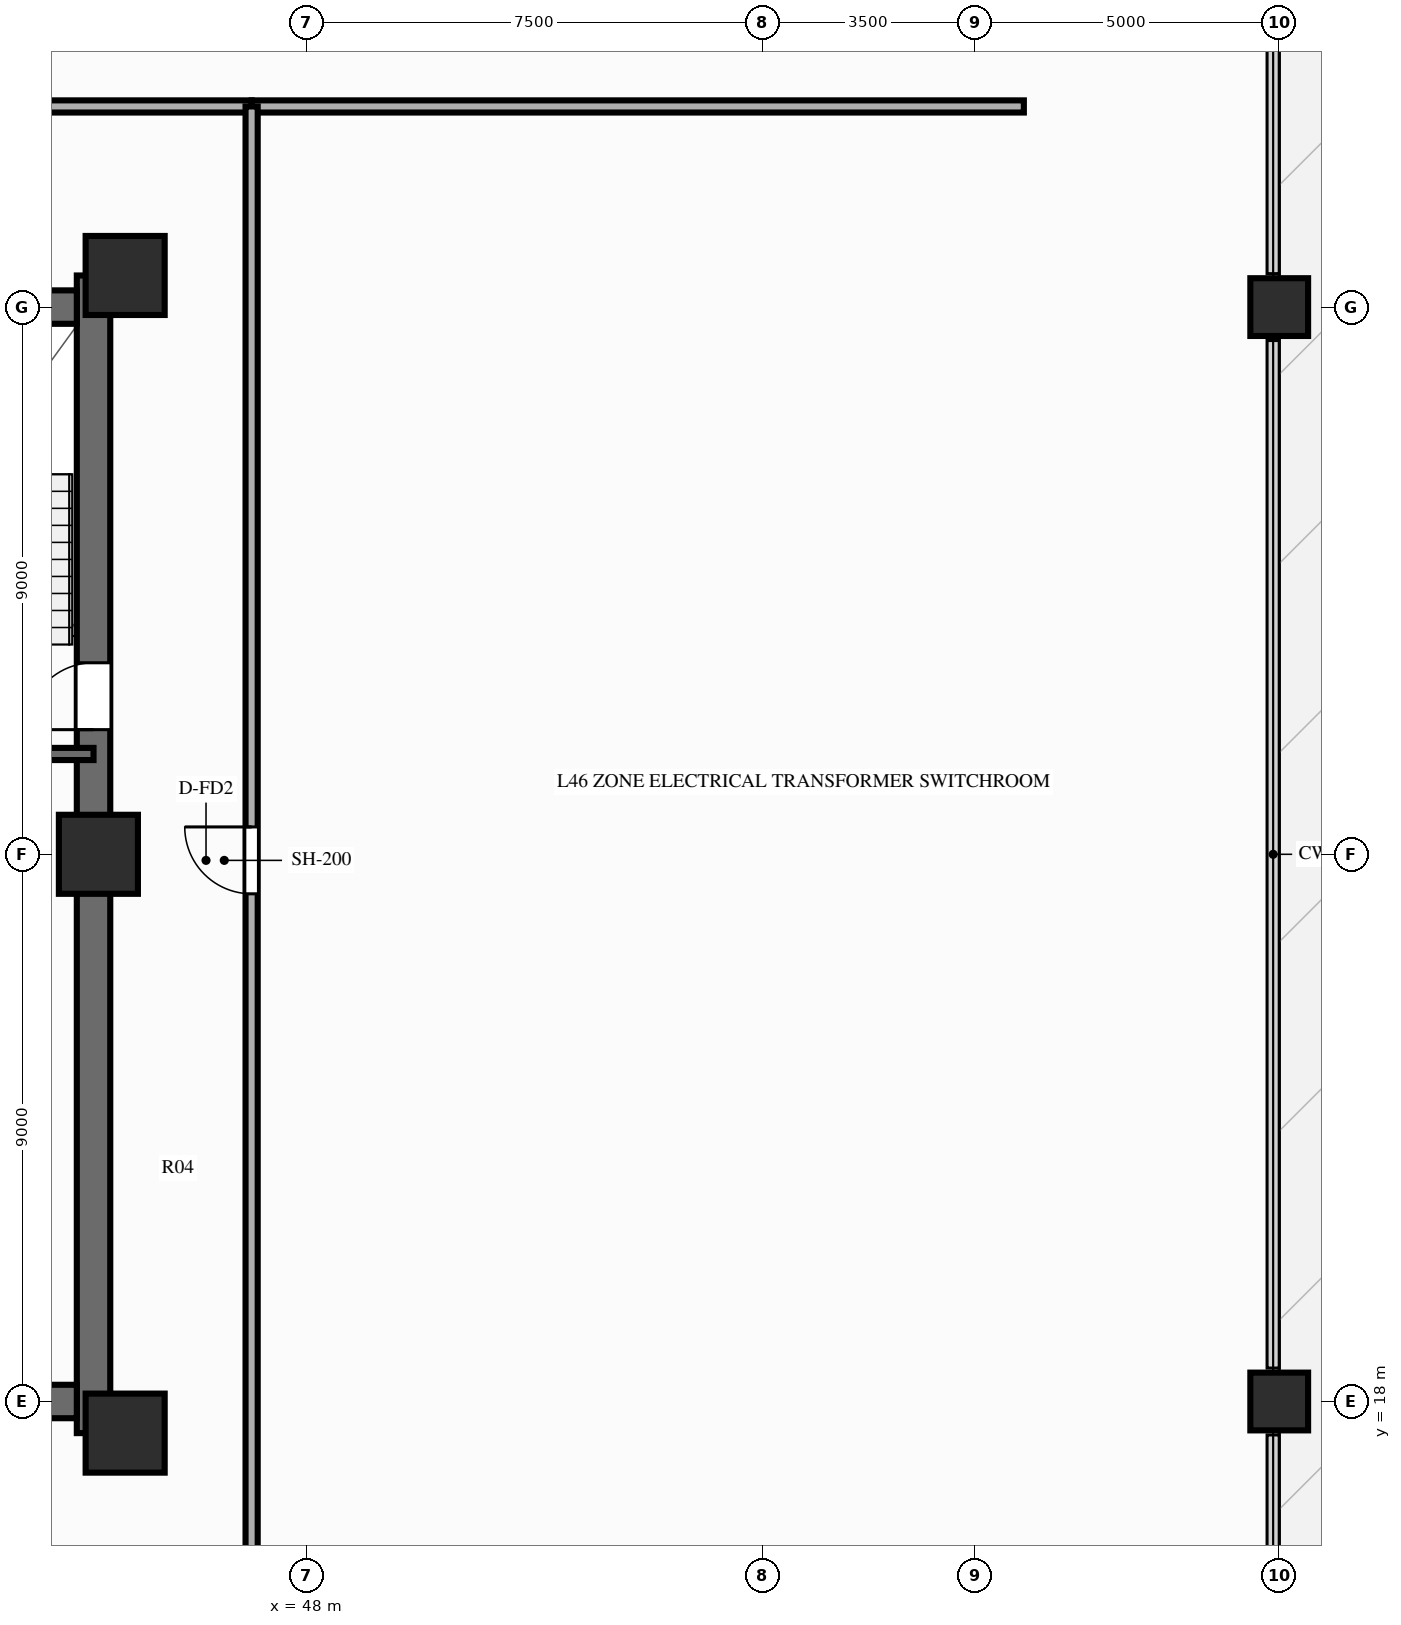
"""IFC4 building model, lengths in metres.
Left out: names, types, materials, properties, quantities, classifications, styles, units other than length and angle.
Written with IfcOpenShell. Run it as: python <this file> out.ifc"""

import sys

from ifc_helpers import new_model, si_unit, direction, frame, frame_2d, origin, origin_2d, place, context, subcontext, project, spatial, rectangle, extrude, source, transform, mapped, element, fill, save


model = new_model("IFC4")
c1 = context("Model", 3, precision=1e-05, world=origin(), true_north=direction((0.0, 1.0)))
c2 = subcontext(c1, "Body", "Model", "MODEL_VIEW")
j1 = project(units=[si_unit("LENGTHUNIT", "METRE"), si_unit("PLANEANGLEUNIT", "RADIAN")], contexts=[c1])
p1 = place(None, origin())
s1 = spatial("IfcSite", under=j1, at=p1, CompositionType="ELEMENT")
p2 = place(p1, origin())
s2 = spatial("IfcBuilding", under=s1, at=p2, CompositionType="ELEMENT")
p3 = place(p2, frame((0.0, 0.0, 144.75)))
s3 = spatial("IfcBuildingStorey", under=s2, at=p3, CompositionType="ELEMENT", Elevation=144.75)
p4 = place(p3, frame((44.5, 17.48, 0.0), z_axis=(0.0, 0.0, 1.0), x_axis=(0.0, 1.0, 0.0)))
e1 = element("IfcWall", 1, at=p4, inside=s3, PredefinedType="SHEAR", context=c2, shape_type="SweptSolid", body=[
    extrude(rectangle(XDim=19.04, YDim=0.55, at=frame_2d((9.52, 0.0))), origin(), (0.0, 0.0, 1.0), 3.95),
])
p5 = place(p4, frame((12.67, 0.0, 0.0), z_axis=(0.0, 0.0, 1.0), x_axis=(-1.0, 0.0, 0.0)))
e2 = element("IfcOpeningElement", 2, at=p5, cuts=e1, PredefinedType="OPENING", context=c2, shape_type="SweptSolid", body=[
    extrude(rectangle(XDim=1.1, YDim=2.15, at=frame_2d((0.55, 1.075))), frame((0.0, 0.287, 0.0), z_axis=(0.0, -1.0, 0.0), x_axis=(1.0, 0.0, 0.0)), (0.0, 0.0, 1.0), 0.574),
])
p6 = place(p3, frame((31.775, 18.0, 0.0), z_axis=(0.0, 0.0, 1.0), x_axis=(1.0, 0.0, 0.0)))
e3 = element("IfcWall", 3, at=p6, inside=s3, PredefinedType="SHEAR", context=c2, shape_type="SweptSolid", body=[
    extrude(rectangle(XDim=12.45, YDim=0.55, at=frame_2d((6.225, 0.0))), origin(), (0.0, 0.0, 1.0), 3.95),
])
p7 = place(p3, frame((31.775, 36.0, 0.0), z_axis=(0.0, 0.0, 1.0), x_axis=(1.0, 0.0, 0.0)))
e4 = element("IfcWall", 4, at=p7, inside=s3, PredefinedType="SHEAR", context=c2, shape_type="SweptSolid", body=[
    extrude(rectangle(XDim=12.45, YDim=0.55, at=frame_2d((6.225, 0.0))), origin(), (0.0, 0.0, 1.0), 3.95),
])
p8 = place(p7, frame((5.175, 0.0, 0.0), z_axis=(0.0, 0.0, 1.0), x_axis=(-1.0, 0.0, 0.0)))
e5 = element("IfcOpeningElement", 5, at=p8, cuts=e4, PredefinedType="OPENING", context=c2, shape_type="SweptSolid", body=[
    extrude(rectangle(XDim=1.4, YDim=2.15, at=frame_2d((0.7, 1.075))), frame((0.0, 0.287, 0.0), z_axis=(0.0, -1.0, 0.0), x_axis=(1.0, 0.0, 0.0)), (0.0, 0.0, 1.0), 0.574),
])
m1 = source(origin(), c2, "Body", "SweptSolid", [
    extrude(rectangle(XDim=1.3, YDim=1.3, at=origin_2d()), origin(), (0.0, 0.0, 1.0), 3.95),
])
for number, where, z_axis, x_axis in (
    (6, (45.02, 17.48, 0.0), (0.0, 0.0, 1.0), (1.0, 0.0, 0.0)),
    (7, (45.02, 36.52, 0.0), (0.0, 0.0, 1.0), (1.0, 0.0, 0.0)),
    (8, (44.58, 27.0, 0.0), (0.0, 0.0, 1.0), (1.0, 0.0, 0.0)),
):
    element("IfcColumn", number, at=place(p3, frame(where, z_axis=z_axis, x_axis=x_axis)), inside=s3, PredefinedType="COLUMN", context=c2, shape_type="MappedRepresentation", body=[
        mapped(m1, transform((0.0, 0.0, 0.0), scale=1.0)),
    ])
m2 = source(origin(), c2, "Body", "SweptSolid", [
    extrude(rectangle(XDim=0.95, YDim=0.95, at=origin_2d()), origin(), (0.0, 0.0, 1.0), 3.95),
])
for number, where, z_axis, x_axis in (
    (9, (64.0, 18.0, 0.0), (0.0, 0.0, 1.0), (1.0, 0.0, 0.0)),
    (10, (64.0, 36.0, 0.0), (0.0, 0.0, 1.0), (1.0, 0.0, 0.0)),
):
    element("IfcColumn", number, at=place(p3, frame(where, z_axis=z_axis, x_axis=x_axis)), inside=s3, PredefinedType="COLUMN", context=c2, shape_type="MappedRepresentation", body=[
        mapped(m2, transform((0.0, 0.0, 0.0), scale=1.0)),
    ])
p9 = place(p3, frame((40.57, 28.65, 0.0), z_axis=(0.0, 0.0, 1.0), x_axis=(1.0, 0.0, 0.0)))
e11 = element("IfcWall", 11, at=p9, inside=s3, PredefinedType="SOLIDWALL", context=c2, shape_type="SweptSolid", body=[
    extrude(rectangle(XDim=3.93, YDim=0.2, at=frame_2d((1.965, 0.0))), origin(), (0.0, 0.0, 1.0), 3.69),
])
p10 = place(p3, frame((28.9, 39.3, 0.0), z_axis=(0.0, 0.0, 1.0), x_axis=(1.0, 0.0, 0.0)))
e12 = element("IfcWall", 12, at=p10, inside=s3, PredefinedType="PARTITIONING", context=c2, shape_type="SweptSolid", body=[
    extrude(rectangle(XDim=18.2, YDim=0.2, at=frame_2d((9.1, 0.0))), origin(), (0.0, 0.0, 1.0), 3.61),
])
p11 = place(p10, frame((8.55, 0.0, 0.0)))
e13 = element("IfcOpeningElement", 13, at=p11, cuts=e12, PredefinedType="OPENING", context=c2, shape_type="SweptSolid", body=[
    extrude(rectangle(XDim=1.1, YDim=2.15, at=frame_2d((0.55, 1.075))), frame((0.0, 0.112, 0.0), z_axis=(0.0, -1.0, 0.0), x_axis=(1.0, 0.0, 0.0)), (0.0, 0.0, 1.0), 0.224),
])
p12 = place(p3, frame((47.1, 39.3, 0.0), z_axis=(0.0, 0.0, 1.0), x_axis=(1.0, 0.0, 0.0)))
e14 = element("IfcWall", 14, at=p12, inside=s3, PredefinedType="PARTITIONING", context=c2, shape_type="SweptSolid", body=[
    extrude(rectangle(XDim=12.7, YDim=0.2, at=frame_2d((6.35, 0.0))), origin(), (0.0, 0.0, 1.0), 3.61),
])
p13 = place(p3, frame((47.1, 14.5, 0.0), z_axis=(0.0, 0.0, 1.0), x_axis=(0.0, 1.0, 0.0)))
e15 = element("IfcWall", 15, at=p13, inside=s3, PredefinedType="PARTITIONING", context=c2, shape_type="SweptSolid", body=[
    extrude(rectangle(XDim=24.8, YDim=0.2, at=frame_2d((12.4, 0.0))), origin(), (0.0, 0.0, 1.0), 3.61),
])
p14 = place(p13, frame((11.85, 0.0, 0.0)))
e16 = element("IfcOpeningElement", 16, at=p14, cuts=e15, PredefinedType="OPENING", context=c2, shape_type="SweptSolid", body=[
    extrude(rectangle(XDim=1.1, YDim=2.15, at=frame_2d((0.55, 1.075))), frame((0.0, 0.112, 0.0), z_axis=(0.0, -1.0, 0.0), x_axis=(1.0, 0.0, 0.0)), (0.0, 0.0, 1.0), 0.224),
])
m3 = source(origin(), c2, "Body", "SweptSolid", [
    extrude(rectangle(XDim=1.1, YDim=2.15, at=frame_2d((0.55, 1.075))), frame((0.0, 0.025, 0.0), z_axis=(0.0, -1.0, 0.0), x_axis=(1.0, 0.0, 0.0)), (0.0, 0.0, 1.0), 0.05),
])
p15 = place(p5, origin())
e17 = element("IfcDoor", 17, at=p15, inside=s3, OperationType="SINGLE_SWING_RIGHT", PredefinedType="DOOR", context=c2, shape_type="MappedRepresentation", body=[
    mapped(m3, transform((0.0, 0.0, 0.0), scale=1.0)),
])
fill(e2, e17)
p16 = place(p14, origin())
e18 = element("IfcDoor", 18, at=p16, inside=s3, OperationType="SINGLE_SWING_RIGHT", PredefinedType="DOOR", context=c2, shape_type="MappedRepresentation", body=[
    mapped(m3, transform((0.0, 0.0, 0.0), scale=1.0)),
])
fill(e16, e18)
save(model, sys.argv[1])
